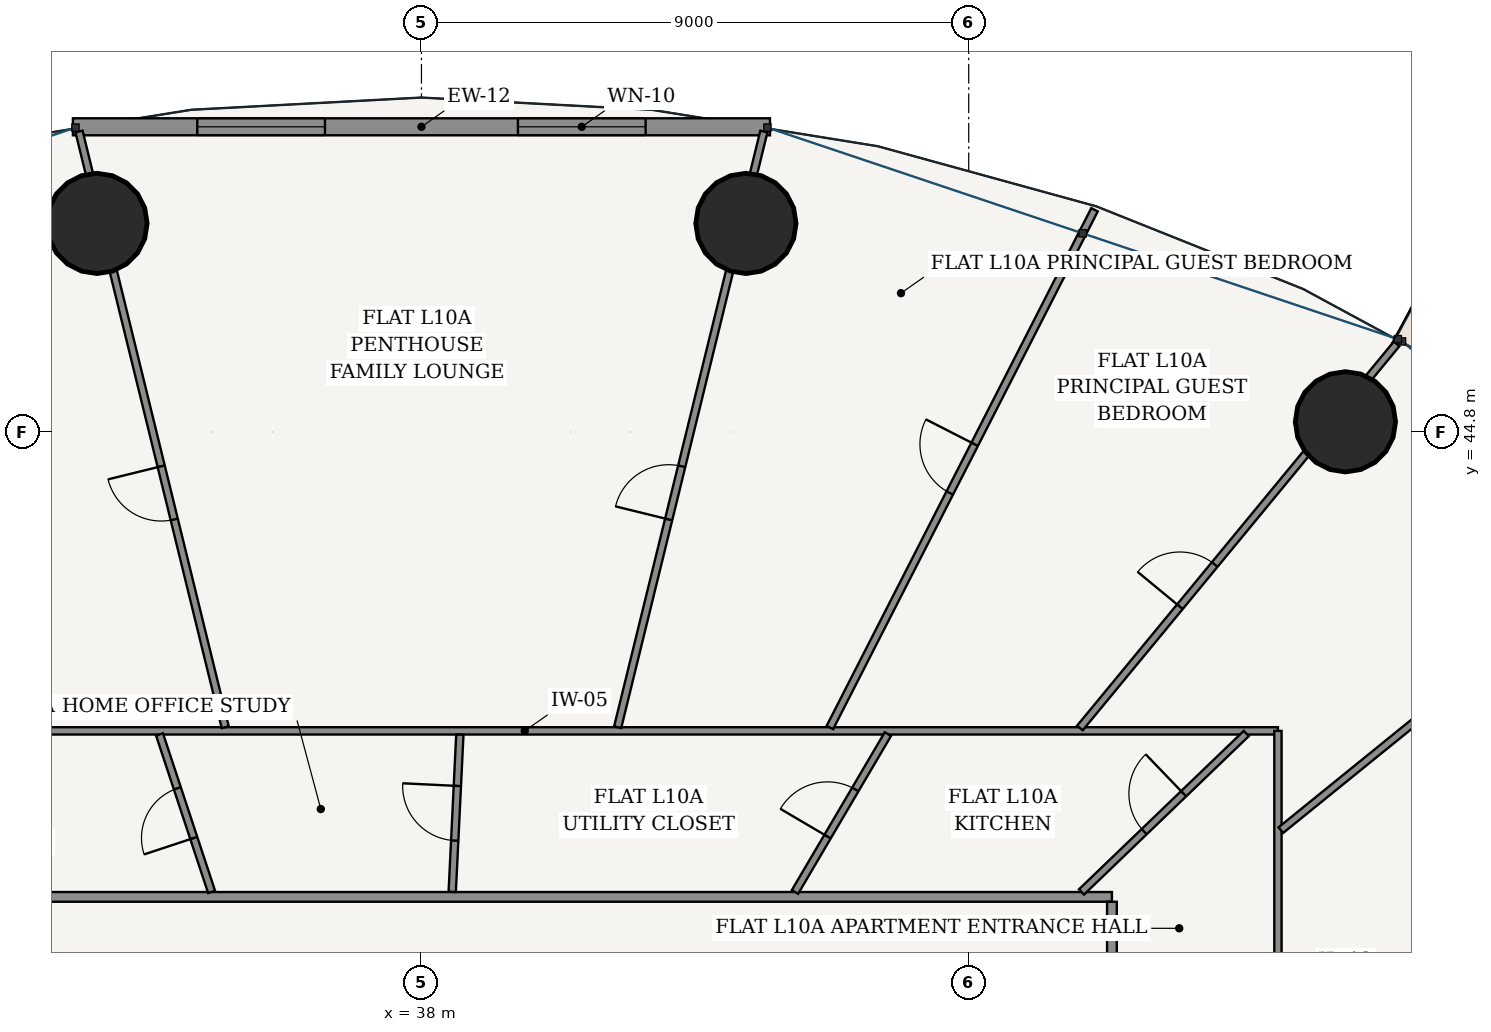
"""IFC4 building model, lengths in metres.
Left out: names, types, materials, properties, quantities, classifications, styles, units other than length and angle.
Written with IfcOpenShell. Run it as: python <this file> out.ifc"""

import sys

from ifc_helpers import new_model, si_unit, direction, frame, frame_2d, origin, origin_2d, place, context, subcontext, project, spatial, rectangle, hollow_circle, extrude, source, transform, mapped, element, fill, save


model = new_model("IFC4")
c1 = context("Model", 3, precision=1e-05, world=origin(), true_north=direction((-0.2419218956, 0.970295726276)))
c2 = subcontext(c1, "Body", "Model", "MODEL_VIEW")
j1 = project(units=[si_unit("LENGTHUNIT", "METRE"), si_unit("PLANEANGLEUNIT", "RADIAN")], contexts=[c1])
p1 = place(None, origin())
s1 = spatial("IfcSite", under=j1, at=p1, CompositionType="ELEMENT")
p2 = place(p1, origin())
s2 = spatial("IfcBuilding", under=s1, at=p2, CompositionType="ELEMENT")
p3 = place(p2, frame((0.0, 0.0, 42.0)))
s3 = spatial("IfcBuildingStorey", under=s2, at=p3, CompositionType="ELEMENT", Elevation=42.0)
for number, where, z_axis, x_axis in (
    (1, (53.195, 44.968, 0.0), (0.0, 0.0, 1.0), (1.0, 0.0, 0.0)),
    (2, (43.336, 48.23, 0.0), (0.0, 0.0, 1.0), (1.0, 0.0, 0.0)),
    (3, (32.664, 48.23, 0.0), (0.0, 0.0, 1.0), (1.0, 0.0, 0.0)),
):
    element("IfcColumn", number, at=place(p3, frame(where, z_axis=z_axis, x_axis=x_axis)), inside=s3, PredefinedType="COLUMN", context=c2, shape_type="SweptSolid", body=[
        extrude(hollow_circle(Radius=0.825, WallThickness=0.05, at=origin_2d()), origin(), (0.0, 0.0, 1.0), 3.6),
    ])
p4 = place(p3, frame((43.732, 49.819, 0.0), z_axis=(0.0, 0.0, 1.0), x_axis=(-1.0, 0.0, 0.0)))
e4 = element("IfcWall", 4, at=p4, inside=s3, PredefinedType="SOLIDWALL", context=c2, shape_type="SweptSolid", body=[
    extrude(rectangle(XDim=11.463, YDim=0.28, at=frame_2d((5.732, 0.0))), origin(), (0.0, 0.0, 1.0), 3.32),
])
p5 = place(p4, frame((2.045, 0.0, 0.85)))
e5 = element("IfcOpeningElement", 5, at=p5, cuts=e4, PredefinedType="OPENING", context=c2, shape_type="SweptSolid", body=[
    extrude(rectangle(XDim=2.1, YDim=1.95, at=frame_2d((1.05, 0.975))), frame((0.0, 0.15, 0.0), z_axis=(0.0, -1.0, 0.0), x_axis=(1.0, 0.0, 0.0)), (0.0, 0.0, 1.0), 0.3),
])
p6 = place(p4, frame((7.318, 0.0, 0.85)))
e6 = element("IfcOpeningElement", 6, at=p6, cuts=e4, PredefinedType="OPENING", context=c2, shape_type="SweptSolid", body=[
    extrude(rectangle(XDim=2.1, YDim=1.95, at=frame_2d((1.05, 0.975))), frame((0.0, 0.15, 0.0), z_axis=(0.0, -1.0, 0.0), x_axis=(1.0, 0.0, 0.0)), (0.0, 0.0, 1.0), 0.3),
])
p7 = place(p3, frame((26.645, 37.155, 0.0), z_axis=(0.0, 0.0, 1.0), x_axis=(1.0, 0.0, 0.0)))
e7 = element("IfcWall", 7, at=p7, inside=s3, PredefinedType="PARTITIONING", context=c2, shape_type="SweptSolid", body=[
    extrude(rectangle(XDim=22.71, YDim=0.16, at=frame_2d((11.355, 0.0))), origin(), (0.0, 0.0, 1.0), 2.688),
])
p8 = place(p3, frame((49.355, 16.525, 0.0), z_axis=(0.0, 0.0, 1.0), x_axis=(0.0, 1.0, 0.0)))
e8 = element("IfcWall", 8, at=p8, inside=s3, PredefinedType="PARTITIONING", context=c2, shape_type="SweptSolid", body=[
    extrude(rectangle(XDim=20.55, YDim=0.16, at=frame_2d((10.275, 0.0))), origin(), (0.0, 0.0, 1.0), 2.688),
])
p9 = place(p8, frame((17.207, 0.0, 0.0)))
e9 = element("IfcOpeningElement", 9, at=p9, cuts=e8, PredefinedType="OPENING", context=c2, shape_type="SweptSolid", body=[
    extrude(rectangle(XDim=0.98, YDim=2.2, at=frame_2d((0.49, 1.1))), frame((0.0, 0.09, 0.0), z_axis=(0.0, -1.0, 0.0), x_axis=(1.0, 0.0, 0.0)), (0.0, 0.0, 1.0), 0.18),
])
p10 = place(p8, frame((1.892, 0.0, 0.0)))
e10 = element("IfcOpeningElement", 10, at=p10, cuts=e8, PredefinedType="OPENING", context=c2, shape_type="SweptSolid", body=[
    extrude(rectangle(XDim=0.98, YDim=2.2, at=frame_2d((0.49, 1.1))), frame((0.0, 0.09, 0.0), z_axis=(0.0, -1.0, 0.0), x_axis=(1.0, 0.0, 0.0)), (0.0, 0.0, 1.0), 0.18),
])
p11 = place(p3, frame((27.312, 39.885, 0.0), z_axis=(0.0, 0.0, 1.0), x_axis=(1.0, 0.0, 0.0)))
e11 = element("IfcWall", 11, at=p11, inside=s3, PredefinedType="PARTITIONING", context=c2, shape_type="SweptSolid", body=[
    extrude(rectangle(XDim=24.772, YDim=0.12, at=frame_2d((12.386, 0.0))), origin(), (0.0, 0.0, 1.0), 2.688),
])
p12 = place(p3, frame((52.085, 39.885, 0.0), z_axis=(0.0, 0.0, 1.0), x_axis=(0.0, -1.0, 0.0)))
e12 = element("IfcWall", 12, at=p12, inside=s3, PredefinedType="PARTITIONING", context=c2, shape_type="SweptSolid", body=[
    extrude(rectangle(XDim=10.713, YDim=0.12, at=frame_2d((5.356, 0.0))), origin(), (0.0, 0.0, 1.0), 2.688),
])
p13 = place(p12, frame((3.965, 0.0, 0.0)))
e13 = element("IfcOpeningElement", 13, at=p13, cuts=e12, PredefinedType="OPENING", context=c2, shape_type="SweptSolid", body=[
    extrude(rectangle(XDim=0.9, YDim=2.15, at=frame_2d((0.45, 1.075))), frame((0.0, 0.07, 0.0), z_axis=(0.0, -1.0, 0.0), x_axis=(1.0, 0.0, 0.0)), (0.0, 0.0, 1.0), 0.14),
])
p14 = place(p3, frame((52.133, 38.253, 0.0), z_axis=(0.0, 0.0, 1.0), x_axis=(0.776936623447, 0.629578814087, 0.0)))
e14 = element("IfcWall", 14, at=p14, inside=s3, PredefinedType="PARTITIONING", context=c2, shape_type="SweptSolid", body=[
    extrude(rectangle(XDim=8.136, YDim=0.12, at=frame_2d((4.068, 0.0))), origin(), (0.0, 0.0, 1.0), 2.762),
])
p15 = place(p14, frame((3.618, 0.0, 0.0)))
e15 = element("IfcOpeningElement", 15, at=p15, cuts=e14, PredefinedType="OPENING", context=c2, shape_type="SweptSolid", body=[
    extrude(rectangle(XDim=0.9, YDim=2.15, at=frame_2d((0.45, 1.075))), frame((0.0, 0.07, 0.0), z_axis=(0.0, -1.0, 0.0), x_axis=(1.0, 0.0, 0.0)), (0.0, 0.0, 1.0), 0.14),
])
p16 = place(p3, frame((48.829, 39.933, 0.0), z_axis=(0.0, 0.0, 1.0), x_axis=(0.636192172227, 0.771530634516, 0.0)))
e16 = element("IfcWall", 16, at=p16, inside=s3, PredefinedType="PARTITIONING", context=c2, shape_type="SweptSolid", body=[
    extrude(rectangle(XDim=8.186, YDim=0.12, at=frame_2d((4.093, 0.0))), origin(), (0.0, 0.0, 1.0), 2.688),
])
p17 = place(p16, frame((2.584, 0.0, 0.0)))
e17 = element("IfcOpeningElement", 17, at=p17, cuts=e16, PredefinedType="OPENING", context=c2, shape_type="SweptSolid", body=[
    extrude(rectangle(XDim=0.9, YDim=2.15, at=frame_2d((0.45, 1.075))), frame((0.0, 0.07, 0.0), z_axis=(0.0, -1.0, 0.0), x_axis=(1.0, 0.0, 0.0)), (0.0, 0.0, 1.0), 0.14),
])
p18 = place(p3, frame((44.717, 39.94, 0.0), z_axis=(0.0, 0.0, 1.0), x_axis=(0.455131303234, 0.890424335256, 0.0)))
e18 = element("IfcWall", 18, at=p18, inside=s3, PredefinedType="PARTITIONING", context=c2, shape_type="SweptSolid", body=[
    extrude(rectangle(XDim=9.562, YDim=0.12, at=frame_2d((4.781, 0.0))), origin(), (0.0, 0.0, 1.0), 2.762),
])
p19 = place(p18, frame((4.331, 0.0, 0.0)))
e19 = element("IfcOpeningElement", 19, at=p19, cuts=e18, PredefinedType="OPENING", context=c2, shape_type="SweptSolid", body=[
    extrude(rectangle(XDim=0.9, YDim=2.15, at=frame_2d((0.45, 1.075))), frame((0.0, 0.07, 0.0), z_axis=(0.0, -1.0, 0.0), x_axis=(1.0, 0.0, 0.0)), (0.0, 0.0, 1.0), 0.14),
])
p20 = place(p3, frame((41.227, 39.945, 0.0), z_axis=(0.0, 0.0, 1.0), x_axis=(0.238375747469, 0.97117300365, 0.0)))
e20 = element("IfcWall", 20, at=p20, inside=s3, PredefinedType="PARTITIONING", context=c2, shape_type="SweptSolid", body=[
    extrude(rectangle(XDim=10.086, YDim=0.12, at=frame_2d((5.043, 0.0))), origin(), (0.0, 0.0, 1.0), 2.688),
])
p21 = place(p20, frame((3.519, 0.0, 0.0)))
e21 = element("IfcOpeningElement", 21, at=p21, cuts=e20, PredefinedType="OPENING", context=c2, shape_type="SweptSolid", body=[
    extrude(rectangle(XDim=0.9, YDim=2.15, at=frame_2d((0.45, 1.075))), frame((0.0, 0.07, 0.0), z_axis=(0.0, -1.0, 0.0), x_axis=(1.0, 0.0, 0.0)), (0.0, 0.0, 1.0), 0.14),
])
p22 = place(p3, frame((34.773, 39.945, 0.0), z_axis=(0.0, 0.0, 1.0), x_axis=(-0.238375747469, 0.97117300365, 0.0)))
e22 = element("IfcWall", 22, at=p22, inside=s3, PredefinedType="PARTITIONING", context=c2, shape_type="SweptSolid", body=[
    extrude(rectangle(XDim=10.086, YDim=0.12, at=frame_2d((5.043, 0.0))), origin(), (0.0, 0.0, 1.0), 2.688),
])
p23 = place(p22, frame((3.518, 0.0, 0.0)))
e23 = element("IfcOpeningElement", 23, at=p23, cuts=e22, PredefinedType="OPENING", context=c2, shape_type="SweptSolid", body=[
    extrude(rectangle(XDim=0.9, YDim=2.15, at=frame_2d((0.45, 1.075))), frame((0.0, 0.07, 0.0), z_axis=(0.0, -1.0, 0.0), x_axis=(1.0, 0.0, 0.0)), (0.0, 0.0, 1.0), 0.14),
])
p24 = place(p3, frame((48.855, 37.236, 0.0), z_axis=(0.0, 0.0, 1.0), x_axis=(0.720835560675, 0.693106120638, 0.0)))
e24 = element("IfcWall", 24, at=p24, inside=s3, PredefinedType="PARTITIONING", context=c2, shape_type="SweptSolid", body=[
    extrude(rectangle(XDim=3.76, YDim=0.12, at=frame_2d((1.88, 0.0))), origin(), (0.0, 0.0, 1.0), 2.999),
])
p25 = place(p24, frame((1.43, 0.0, 0.0)))
e25 = element("IfcOpeningElement", 25, at=p25, cuts=e24, PredefinedType="OPENING", context=c2, shape_type="SweptSolid", body=[
    extrude(rectangle(XDim=0.9, YDim=2.15, at=frame_2d((0.45, 1.075))), frame((0.0, 0.07, 0.0), z_axis=(0.0, -1.0, 0.0), x_axis=(1.0, 0.0, 0.0)), (0.0, 0.0, 1.0), 0.14),
])
p26 = place(p3, frame((44.143, 37.237, 0.0), z_axis=(0.0, 0.0, 1.0), x_axis=(0.507275244465, 0.861784094976, 0.0)))
e26 = element("IfcWall", 26, at=p26, inside=s3, PredefinedType="PARTITIONING", context=c2, shape_type="SweptSolid", body=[
    extrude(rectangle(XDim=3.011, YDim=0.12, at=frame_2d((1.505, 0.0))), origin(), (0.0, 0.0, 1.0), 3.32),
])
p27 = place(p26, frame((1.055, 0.0, 0.0)))
e27 = element("IfcOpeningElement", 27, at=p27, cuts=e26, PredefinedType="OPENING", context=c2, shape_type="SweptSolid", body=[
    extrude(rectangle(XDim=0.9, YDim=2.15, at=frame_2d((0.45, 1.075))), frame((0.0, 0.07, 0.0), z_axis=(0.0, -1.0, 0.0), x_axis=(1.0, 0.0, 0.0)), (0.0, 0.0, 1.0), 0.14),
])
p28 = place(p3, frame((38.506, 37.237, 0.0), z_axis=(0.0, 0.0, 1.0), x_axis=(0.048376073987, 0.998829192338, 0.0)))
e28 = element("IfcWall", 28, at=p28, inside=s3, PredefinedType="PARTITIONING", context=c2, shape_type="SweptSolid", body=[
    extrude(rectangle(XDim=2.589, YDim=0.12, at=frame_2d((1.294, 0.0))), origin(), (0.0, 0.0, 1.0), 3.32),
])
p29 = place(p28, frame((0.844, 0.0, 0.0)))
e29 = element("IfcOpeningElement", 29, at=p29, cuts=e28, PredefinedType="OPENING", context=c2, shape_type="SweptSolid", body=[
    extrude(rectangle(XDim=0.9, YDim=2.15, at=frame_2d((0.45, 1.075))), frame((0.0, 0.07, 0.0), z_axis=(0.0, -1.0, 0.0), x_axis=(1.0, 0.0, 0.0)), (0.0, 0.0, 1.0), 0.14),
])
p30 = place(p3, frame((34.549, 37.237, 0.0), z_axis=(0.0, 0.0, 1.0), x_axis=(-0.313863409377, 0.949468145992, 0.0)))
e30 = element("IfcWall", 30, at=p30, inside=s3, PredefinedType="PARTITIONING", context=c2, shape_type="SweptSolid", body=[
    extrude(rectangle(XDim=2.727, YDim=0.12, at=frame_2d((1.364, 0.0))), origin(), (0.0, 0.0, 1.0), 3.32),
])
p31 = place(p30, frame((0.934, 0.0, 0.0)))
e31 = element("IfcOpeningElement", 31, at=p31, cuts=e30, PredefinedType="OPENING", context=c2, shape_type="SweptSolid", body=[
    extrude(rectangle(XDim=0.86, YDim=2.15, at=frame_2d((0.43, 1.075))), frame((0.0, 0.07, 0.0), z_axis=(0.0, -1.0, 0.0), x_axis=(1.0, 0.0, 0.0)), (0.0, 0.0, 1.0), 0.14),
])
m1 = source(origin(), c2, "Body", "SweptSolid", [
    extrude(rectangle(XDim=2.1, YDim=1.95, at=frame_2d((1.05, 0.975))), frame((0.0, 0.03, 0.0), z_axis=(0.0, -1.0, 0.0), x_axis=(1.0, 0.0, 0.0)), (0.0, 0.0, 1.0), 0.06),
])
p32 = place(p5, origin())
e32 = element("IfcWindow", 32, at=p32, inside=s3, PartitioningType="SINGLE_PANEL", PredefinedType="WINDOW", context=c2, shape_type="MappedRepresentation", body=[
    mapped(m1, transform((0.0, 0.0, 0.0), scale=1.0)),
])
fill(e5, e32)
p33 = place(p6, origin())
e33 = element("IfcWindow", 33, at=p33, inside=s3, PartitioningType="SINGLE_PANEL", PredefinedType="WINDOW", context=c2, shape_type="MappedRepresentation", body=[
    mapped(m1, transform((0.0, 0.0, 0.0), scale=1.0)),
])
fill(e6, e33)
m2 = source(origin(), c2, "Body", "SweptSolid", [
    extrude(rectangle(XDim=0.9, YDim=2.15, at=frame_2d((0.45, 1.075))), frame((0.0, 0.025, 0.0), z_axis=(0.0, -1.0, 0.0), x_axis=(1.0, 0.0, 0.0)), (0.0, 0.0, 1.0), 0.05),
])
p34 = place(p25, origin())
e34 = element("IfcDoor", 34, at=p34, inside=s3, OperationType="SINGLE_SWING_RIGHT", PredefinedType="DOOR", context=c2, shape_type="MappedRepresentation", body=[
    mapped(m2, transform((0.0, 0.0, 0.0), scale=1.0)),
])
fill(e25, e34)
p35 = place(p27, origin())
e35 = element("IfcDoor", 35, at=p35, inside=s3, OperationType="SINGLE_SWING_LEFT", PredefinedType="DOOR", context=c2, shape_type="MappedRepresentation", body=[
    mapped(m2, transform((0.0, 0.0, 0.0), scale=1.0)),
])
fill(e27, e35)
p36 = place(p29, origin())
e36 = element("IfcDoor", 36, at=p36, inside=s3, OperationType="SINGLE_SWING_RIGHT", PredefinedType="DOOR", context=c2, shape_type="MappedRepresentation", body=[
    mapped(m2, transform((0.0, 0.0, 0.0), scale=1.0)),
])
fill(e29, e36)
m3 = source(origin(), c2, "Body", "SweptSolid", [
    extrude(rectangle(XDim=0.86, YDim=2.15, at=frame_2d((0.43, 1.075))), frame((0.0, 0.025, 0.0), z_axis=(0.0, -1.0, 0.0), x_axis=(1.0, 0.0, 0.0)), (0.0, 0.0, 1.0), 0.05),
])
p37 = place(p31, origin())
e37 = element("IfcDoor", 37, at=p37, inside=s3, OperationType="SINGLE_SWING_LEFT", PredefinedType="DOOR", context=c2, shape_type="MappedRepresentation", body=[
    mapped(m3, transform((0.0, 0.0, 0.0), scale=1.0)),
])
fill(e31, e37)
p38 = place(p17, origin())
e38 = element("IfcDoor", 38, at=p38, inside=s3, OperationType="SINGLE_SWING_LEFT", PredefinedType="DOOR", context=c2, shape_type="MappedRepresentation", body=[
    mapped(m2, transform((0.0, 0.0, 0.0), scale=1.0)),
])
fill(e17, e38)
p39 = place(p19, origin())
e39 = element("IfcDoor", 39, at=p39, inside=s3, OperationType="SINGLE_SWING_RIGHT", PredefinedType="DOOR", context=c2, shape_type="MappedRepresentation", body=[
    mapped(m2, transform((0.0, 0.0, 0.0), scale=1.0)),
])
fill(e19, e39)
p40 = place(p21, origin())
e40 = element("IfcDoor", 40, at=p40, inside=s3, OperationType="SINGLE_SWING_LEFT", PredefinedType="DOOR", context=c2, shape_type="MappedRepresentation", body=[
    mapped(m2, transform((0.0, 0.0, 0.0), scale=1.0)),
])
fill(e21, e40)
p41 = place(p23, origin())
e41 = element("IfcDoor", 41, at=p41, inside=s3, OperationType="SINGLE_SWING_RIGHT", PredefinedType="DOOR", context=c2, shape_type="MappedRepresentation", body=[
    mapped(m2, transform((0.0, 0.0, 0.0), scale=1.0)),
])
fill(e23, e41)
save(model, sys.argv[1])
